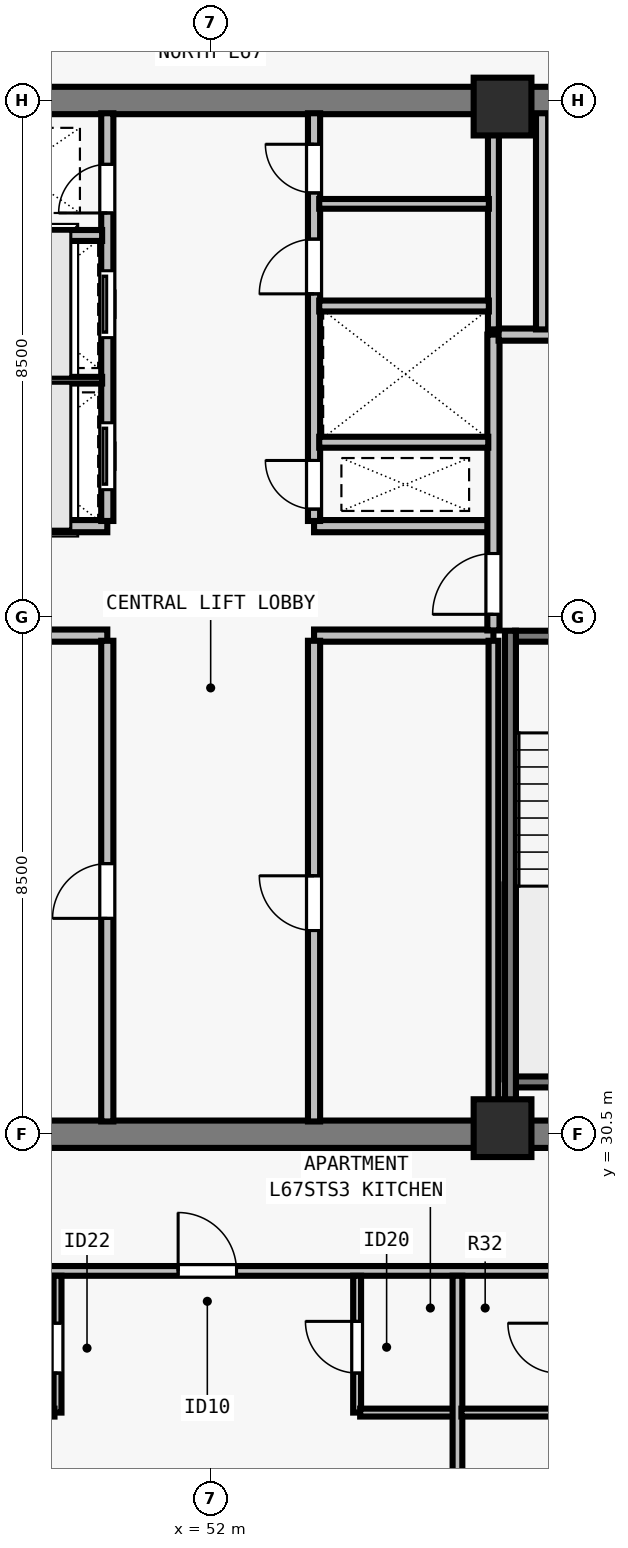
"""IFC4 building model, lengths in metres.
Left out: names, types, materials, properties, quantities, classifications, styles, units other than length and angle.
Written with IfcOpenShell. Run it as: python <this file> out.ifc"""

import sys

from ifc_helpers import new_model, si_unit, direction, frame, frame_2d, origin, origin_2d, place, context, subcontext, project, spatial, rectangle, extrude, element, fill, save


model = new_model("IFC4")
c1 = context("Model", 3, precision=1e-05, world=origin(), true_north=direction((0.0, 1.0)))
c2 = subcontext(c1, "Body", "Model", "MODEL_VIEW")
j1 = project(units=[si_unit("LENGTHUNIT", "METRE"), si_unit("PLANEANGLEUNIT", "RADIAN")], contexts=[c1])
p1 = place(None, origin())
s1 = spatial("IfcSite", under=j1, at=p1, CompositionType="ELEMENT")
p2 = place(p1, origin())
s2 = spatial("IfcBuilding", under=s1, at=p2, CompositionType="ELEMENT")
p3 = place(p2, frame((0.0, 0.0, 244.5)))
s3 = spatial("IfcBuildingStorey", under=s2, at=p3, CompositionType="ELEMENT", Elevation=244.5)
for number, where, z_axis, x_axis in (
    (1, (56.8, 30.6, 0.0), (0.0, 0.0, 1.0), (1.0, 0.0, 0.0)),
    (2, (56.8, 47.4, 0.0), (0.0, 0.0, 1.0), (1.0, 0.0, 0.0)),
):
    element("IfcColumn", number, at=place(p3, frame(where, z_axis=z_axis, x_axis=x_axis)), inside=s3, PredefinedType="COLUMN", context=c2, shape_type="SweptSolid", body=[
        extrude(rectangle(XDim=0.95, YDim=0.95, at=origin_2d()), origin(), (0.0, 0.0, 1.0), 3.5),
    ])
for number, where, z_axis, x_axis in (
    (3, (43.275, 30.5, 0.0), (0.0, 0.0, 1.0), (1.0, 0.0, 0.0)),
    (4, (43.275, 47.5, 0.0), (0.0, 0.0, 1.0), (1.0, 0.0, 0.0)),
):
    element("IfcWall", number, at=place(p3, frame(where, z_axis=z_axis, x_axis=x_axis)), inside=s3, PredefinedType="SHEAR", context=c2, shape_type="SweptSolid", body=[
        extrude(rectangle(XDim=17.45, YDim=0.45, at=frame_2d((8.725, 0.0))), origin(), (0.0, 0.0, 1.0), 3.29),
    ])
for number, where, z_axis, x_axis in (
    (5, (47.35, 38.7, 0.0), (0.0, 0.0, 1.0), (1.0, 0.0, 0.0)),
    (6, (47.35, 40.5, 0.0), (0.0, 0.0, 1.0), (1.0, 0.0, 0.0)),
    (7, (53.7, 38.7, 0.0), (0.0, 0.0, 1.0), (1.0, 0.0, 0.0)),
    (8, (53.7, 40.5, 0.0), (0.0, 0.0, 1.0), (1.0, 0.0, 0.0)),
):
    element("IfcWall", number, at=place(p3, frame(where, z_axis=z_axis, x_axis=x_axis)), inside=s3, PredefinedType="SOLIDWALL", context=c2, shape_type="SweptSolid", body=[
        extrude(rectangle(XDim=2.95, YDim=0.2, at=frame_2d((1.475, 0.0))), origin(), (0.0, 0.0, 1.0), 3.29),
    ])
p4 = place(p3, frame((50.3, 30.71, 0.0), z_axis=(0.0, 0.0, 1.0), x_axis=(0.0, 1.0, 0.0)))
e9 = element("IfcWall", 9, at=p4, inside=s3, PredefinedType="SOLIDWALL", context=c2, shape_type="SweptSolid", body=[
    extrude(rectangle(XDim=7.905, YDim=0.2, at=frame_2d((3.953, 0.0))), origin(), (0.0, 0.0, 1.0), 3.29),
])
p5 = place(p4, frame((3.34, 0.0, 0.0)))
e10 = element("IfcOpeningElement", 10, at=p5, cuts=e9, PredefinedType="OPENING", context=c2, shape_type="SweptSolid", body=[
    extrude(rectangle(XDim=0.9, YDim=2.12, at=frame_2d((0.45, 1.06))), frame((0.0, 0.11, 0.0), z_axis=(0.0, -1.0, 0.0), x_axis=(1.0, 0.0, 0.0)), (0.0, 0.0, 1.0), 0.22),
])
p6 = place(p3, frame((53.7, 30.71, 0.0), z_axis=(0.0, 0.0, 1.0), x_axis=(0.0, 1.0, 0.0)))
e11 = element("IfcWall", 11, at=p6, inside=s3, PredefinedType="SOLIDWALL", context=c2, shape_type="SweptSolid", body=[
    extrude(rectangle(XDim=7.905, YDim=0.2, at=frame_2d((3.953, 0.0))), origin(), (0.0, 0.0, 1.0), 3.29),
])
p7 = place(p6, frame((3.14, 0.0, 0.0)))
e12 = element("IfcOpeningElement", 12, at=p7, cuts=e11, PredefinedType="OPENING", context=c2, shape_type="SweptSolid", body=[
    extrude(rectangle(XDim=0.9, YDim=2.12, at=frame_2d((0.45, 1.06))), frame((0.0, 0.11, 0.0), z_axis=(0.0, -1.0, 0.0), x_axis=(1.0, 0.0, 0.0)), (0.0, 0.0, 1.0), 0.22),
])
p8 = place(p3, frame((50.3, 40.585, 0.0), z_axis=(0.0, 0.0, 1.0), x_axis=(0.0, 1.0, 0.0)))
e13 = element("IfcWall", 13, at=p8, inside=s3, PredefinedType="SOLIDWALL", context=c2, shape_type="SweptSolid", body=[
    extrude(rectangle(XDim=6.705, YDim=0.2, at=frame_2d((3.353, 0.0))), origin(), (0.0, 0.0, 1.0), 3.29),
])
p9 = place(p8, frame((0.515, 0.0, 0.0)))
e14 = element("IfcOpeningElement", 14, at=p9, cuts=e13, PredefinedType="OPENING", context=c2, shape_type="SweptSolid", body=[
    extrude(rectangle(XDim=1.1, YDim=2.2, at=frame_2d((0.55, 1.1))), frame((0.0, 0.11, 0.0), z_axis=(0.0, -1.0, 0.0), x_axis=(1.0, 0.0, 0.0)), (0.0, 0.0, 1.0), 0.22),
])
p10 = place(p8, frame((3.015, 0.0, 0.0)))
e15 = element("IfcOpeningElement", 15, at=p10, cuts=e13, PredefinedType="OPENING", context=c2, shape_type="SweptSolid", body=[
    extrude(rectangle(XDim=1.1, YDim=2.2, at=frame_2d((0.55, 1.1))), frame((0.0, 0.11, 0.0), z_axis=(0.0, -1.0, 0.0), x_axis=(1.0, 0.0, 0.0)), (0.0, 0.0, 1.0), 0.22),
])
p11 = place(p8, frame((5.065, 0.0, 0.0)))
e16 = element("IfcOpeningElement", 16, at=p11, cuts=e13, PredefinedType="OPENING", context=c2, shape_type="SweptSolid", body=[
    extrude(rectangle(XDim=0.8, YDim=2.08, at=frame_2d((0.4, 1.04))), frame((0.0, 0.11, 0.0), z_axis=(0.0, -1.0, 0.0), x_axis=(1.0, 0.0, 0.0)), (0.0, 0.0, 1.0), 0.22),
])
p12 = place(p3, frame((53.7, 40.585, 0.0), z_axis=(0.0, 0.0, 1.0), x_axis=(0.0, 1.0, 0.0)))
e17 = element("IfcWall", 17, at=p12, inside=s3, PredefinedType="SOLIDWALL", context=c2, shape_type="SweptSolid", body=[
    extrude(rectangle(XDim=6.705, YDim=0.2, at=frame_2d((3.353, 0.0))), origin(), (0.0, 0.0, 1.0), 3.29),
])
p13 = place(p12, frame((0.195, 0.0, 0.0)))
e18 = element("IfcOpeningElement", 18, at=p13, cuts=e17, PredefinedType="OPENING", context=c2, shape_type="SweptSolid", body=[
    extrude(rectangle(XDim=0.8, YDim=2.08, at=frame_2d((0.4, 1.04))), frame((0.0, 0.11, 0.0), z_axis=(0.0, -1.0, 0.0), x_axis=(1.0, 0.0, 0.0)), (0.0, 0.0, 1.0), 0.22),
])
p14 = place(p12, frame((3.735, 0.0, 0.0)))
e19 = element("IfcOpeningElement", 19, at=p14, cuts=e17, PredefinedType="OPENING", context=c2, shape_type="SweptSolid", body=[
    extrude(rectangle(XDim=0.9, YDim=2.12, at=frame_2d((0.45, 1.06))), frame((0.0, 0.11, 0.0), z_axis=(0.0, -1.0, 0.0), x_axis=(1.0, 0.0, 0.0)), (0.0, 0.0, 1.0), 0.22),
])
p15 = place(p12, frame((5.395, 0.0, 0.0)))
e20 = element("IfcOpeningElement", 20, at=p15, cuts=e17, PredefinedType="OPENING", context=c2, shape_type="SweptSolid", body=[
    extrude(rectangle(XDim=0.8, YDim=2.1, at=frame_2d((0.4, 1.05))), frame((0.0, 0.11, 0.0), z_axis=(0.0, -1.0, 0.0), x_axis=(1.0, 0.0, 0.0)), (0.0, 0.0, 1.0), 0.22),
])
p16 = place(p3, frame((56.65, 38.785, 0.0), z_axis=(0.0, 0.0, 1.0), x_axis=(0.0, 1.0, 0.0)))
e21 = element("IfcWall", 21, at=p16, inside=s3, PredefinedType="SOLIDWALL", context=c2, shape_type="SweptSolid", body=[
    extrude(rectangle(XDim=4.865, YDim=0.2, at=frame_2d((2.433, 0.0))), origin(), (0.0, 0.0, 1.0), 3.29),
])
p17 = place(p16, frame((0.265, 0.0, 0.0)))
e22 = element("IfcOpeningElement", 22, at=p17, cuts=e21, PredefinedType="OPENING", context=c2, shape_type="SweptSolid", body=[
    extrude(rectangle(XDim=1.0, YDim=2.15, at=frame_2d((0.5, 1.075))), frame((0.0, 0.11, 0.0), z_axis=(0.0, -1.0, 0.0), x_axis=(1.0, 0.0, 0.0)), (0.0, 0.0, 1.0), 0.22),
])
p18 = place(p3, frame((56.735, 43.65, 0.0), z_axis=(0.0, 0.0, 1.0), x_axis=(1.0, 0.0, 0.0)))
e23 = element("IfcWall", 23, at=p18, inside=s3, PredefinedType="SOLIDWALL", context=c2, shape_type="SweptSolid", body=[
    extrude(rectangle(XDim=3.555, YDim=0.2, at=frame_2d((1.777, 0.0))), origin(), (0.0, 0.0, 1.0), 3.29),
])
p19 = place(p18, frame((1.295, 0.0, 0.0)))
e24 = element("IfcOpeningElement", 24, at=p19, cuts=e23, PredefinedType="OPENING", context=c2, shape_type="SweptSolid", body=[
    extrude(rectangle(XDim=1.1, YDim=2.2, at=frame_2d((0.55, 1.1))), frame((0.0, 0.11, 0.0), z_axis=(0.0, -1.0, 0.0), x_axis=(1.0, 0.0, 0.0)), (0.0, 0.0, 1.0), 0.22),
])
p20 = place(p3, frame((57.45, 43.735, 0.0), z_axis=(0.0, 0.0, 1.0), x_axis=(0.0, 1.0, 0.0)))
e25 = element("IfcWall", 25, at=p20, inside=s3, PredefinedType="SOLIDWALL", context=c2, shape_type="SweptSolid", body=[
    extrude(rectangle(XDim=3.555, YDim=0.2, at=frame_2d((1.777, 0.0))), origin(), (0.0, 0.0, 1.0), 3.29),
])
p21 = place(p3, frame((56.65, 30.71, 0.0), z_axis=(0.0, 0.0, 1.0), x_axis=(0.0, 1.0, 0.0)))
e26 = element("IfcWall", 26, at=p21, inside=s3, PredefinedType="PARTITIONING", context=c2, shape_type="SweptSolid", body=[
    extrude(rectangle(XDim=7.905, YDim=0.16, at=frame_2d((3.953, 0.0))), origin(), (0.0, 0.0, 1.0), 3.29),
])
p22 = place(p3, frame((47.435, 42.9, 0.0), z_axis=(0.0, 0.0, 1.0), x_axis=(1.0, 0.0, 0.0)))
e27 = element("IfcWall", 27, at=p22, inside=s3, PredefinedType="PARTITIONING", context=c2, shape_type="SweptSolid", body=[
    extrude(rectangle(XDim=2.78, YDim=0.11, at=frame_2d((1.39, 0.0))), origin(), (0.0, 0.0, 1.0), 3.29),
])
p23 = place(p3, frame((47.425, 45.28, 0.0), z_axis=(0.0, 0.0, 1.0), x_axis=(1.0, 0.0, 0.0)))
e28 = element("IfcWall", 28, at=p23, inside=s3, PredefinedType="SOLIDWALL", context=c2, shape_type="SweptSolid", body=[
    extrude(rectangle(XDim=2.79, YDim=0.18, at=frame_2d((1.395, 0.0))), origin(), (0.0, 0.0, 1.0), 3.29),
])
p24 = place(p3, frame((56.65, 43.735, 0.0), z_axis=(0.0, 0.0, 1.0), x_axis=(0.0, 1.0, 0.0)))
e29 = element("IfcWall", 29, at=p24, inside=s3, PredefinedType="SOLIDWALL", context=c2, shape_type="SweptSolid", body=[
    extrude(rectangle(XDim=3.555, YDim=0.18, at=frame_2d((1.777, 0.0))), origin(), (0.0, 0.0, 1.0), 3.29),
])
p25 = place(p3, frame((53.785, 41.88, 0.0), z_axis=(0.0, 0.0, 1.0), x_axis=(1.0, 0.0, 0.0)))
e30 = element("IfcWall", 30, at=p25, inside=s3, PredefinedType="SOLIDWALL", context=c2, shape_type="SweptSolid", body=[
    extrude(rectangle(XDim=2.78, YDim=0.18, at=frame_2d((1.39, 0.0))), origin(), (0.0, 0.0, 1.0), 3.29),
])
p26 = place(p3, frame((53.785, 44.12, 0.0), z_axis=(0.0, 0.0, 1.0), x_axis=(1.0, 0.0, 0.0)))
e31 = element("IfcWall", 31, at=p26, inside=s3, PredefinedType="SOLIDWALL", context=c2, shape_type="SweptSolid", body=[
    extrude(rectangle(XDim=2.79, YDim=0.18, at=frame_2d((1.395, 0.0))), origin(), (0.0, 0.0, 1.0), 3.29),
])
p27 = place(p3, frame((53.785, 45.8, 0.0), z_axis=(0.0, 0.0, 1.0), x_axis=(1.0, 0.0, 0.0)))
e32 = element("IfcWall", 32, at=p27, inside=s3, PredefinedType="PARTITIONING", context=c2, shape_type="SweptSolid", body=[
    extrude(rectangle(XDim=2.79, YDim=0.16, at=frame_2d((1.395, 0.0))), origin(), (0.0, 0.0, 1.0), 3.29),
])
p28 = place(p3, frame((29.805, 28.252, 0.0), z_axis=(0.0, 0.0, 1.0), x_axis=(1.0, 0.0, 0.0)))
e33 = element("IfcWall", 33, at=p28, inside=s3, PredefinedType="PARTITIONING", context=c2, shape_type="SweptSolid", body=[
    extrude(rectangle(XDim=44.39, YDim=0.16, at=frame_2d((22.195, 0.0))), origin(), (0.0, 0.0, 1.0), 2.958),
])
p29 = place(p28, frame((3.872, 0.0, 0.0)))
e34 = element("IfcOpeningElement", 34, at=p29, cuts=e33, PredefinedType="OPENING", context=c2, shape_type="SweptSolid", body=[
    extrude(rectangle(XDim=0.96, YDim=2.18, at=frame_2d((0.48, 1.09))), frame((0.0, 0.09, 0.0), z_axis=(0.0, -1.0, 0.0), x_axis=(1.0, 0.0, 0.0)), (0.0, 0.0, 1.0), 0.18),
])
p30 = place(p28, frame((12.828, 0.0, 0.0)))
e35 = element("IfcOpeningElement", 35, at=p30, cuts=e33, PredefinedType="OPENING", context=c2, shape_type="SweptSolid", body=[
    extrude(rectangle(XDim=0.96, YDim=2.18, at=frame_2d((0.48, 1.09))), frame((0.0, 0.09, 0.0), z_axis=(0.0, -1.0, 0.0), x_axis=(1.0, 0.0, 0.0)), (0.0, 0.0, 1.0), 0.18),
])
p31 = place(p28, frame((21.66, 0.0, 0.0)))
e36 = element("IfcOpeningElement", 36, at=p31, cuts=e33, PredefinedType="OPENING", context=c2, shape_type="SweptSolid", body=[
    extrude(rectangle(XDim=0.96, YDim=2.18, at=frame_2d((0.48, 1.09))), frame((0.0, 0.09, 0.0), z_axis=(0.0, -1.0, 0.0), x_axis=(1.0, 0.0, 0.0)), (0.0, 0.0, 1.0), 0.18),
])
p32 = place(p28, frame((30.492, 0.0, 0.0)))
e37 = element("IfcOpeningElement", 37, at=p32, cuts=e33, PredefinedType="OPENING", context=c2, shape_type="SweptSolid", body=[
    extrude(rectangle(XDim=0.96, YDim=2.18, at=frame_2d((0.48, 1.09))), frame((0.0, 0.09, 0.0), z_axis=(0.0, -1.0, 0.0), x_axis=(1.0, 0.0, 0.0)), (0.0, 0.0, 1.0), 0.18),
])
p33 = place(p28, frame((39.503, 0.0, 0.0)))
e38 = element("IfcOpeningElement", 38, at=p33, cuts=e33, PredefinedType="OPENING", context=c2, shape_type="SweptSolid", body=[
    extrude(rectangle(XDim=0.96, YDim=2.18, at=frame_2d((0.48, 1.09))), frame((0.0, 0.09, 0.0), z_axis=(0.0, -1.0, 0.0), x_axis=(1.0, 0.0, 0.0)), (0.0, 0.0, 1.0), 0.18),
])
p34 = place(p3, frame((49.481, 25.923, 0.0), z_axis=(0.0, 0.0, 1.0), x_axis=(0.0, 1.0, 0.0)))
e39 = element("IfcWall", 39, at=p34, inside=s3, PredefinedType="PLUMBINGWALL", context=c2, shape_type="SweptSolid", body=[
    extrude(rectangle(XDim=2.25, YDim=0.13, at=frame_2d((1.125, 0.0))), origin(), (0.0, 0.0, 1.0), 3.29),
])
p35 = place(p34, frame((0.65, 0.0, 0.0)))
e40 = element("IfcOpeningElement", 40, at=p35, cuts=e39, PredefinedType="OPENING", context=c2, shape_type="SweptSolid", body=[
    extrude(rectangle(XDim=0.82, YDim=2.1, at=frame_2d((0.41, 1.05))), frame((0.0, 0.075, 0.0), z_axis=(0.0, -1.0, 0.0), x_axis=(1.0, 0.0, 0.0)), (0.0, 0.0, 1.0), 0.15),
])
p36 = place(p3, frame((47.896, 25.923, 0.0), z_axis=(0.0, 0.0, 1.0), x_axis=(1.0, 0.0, 0.0)))
e41 = element("IfcWall", 41, at=p36, inside=s3, PredefinedType="PLUMBINGWALL", context=c2, shape_type="SweptSolid", body=[
    extrude(rectangle(XDim=1.535, YDim=0.13, at=frame_2d((0.768, 0.0))), origin(), (0.0, 0.0, 1.0), 3.29),
])
p37 = place(p3, frame((54.408, 25.923, 0.0), z_axis=(0.0, 0.0, 1.0), x_axis=(0.0, 1.0, 0.0)))
e42 = element("IfcWall", 42, at=p37, inside=s3, PredefinedType="PLUMBINGWALL", context=c2, shape_type="SweptSolid", body=[
    extrude(rectangle(XDim=2.25, YDim=0.13, at=frame_2d((1.125, 0.0))), origin(), (0.0, 0.0, 1.0), 2.958),
])
p38 = place(p37, frame((0.65, 0.0, 0.0)))
e43 = element("IfcOpeningElement", 43, at=p38, cuts=e42, PredefinedType="OPENING", context=c2, shape_type="SweptSolid", body=[
    extrude(rectangle(XDim=0.85, YDim=2.1, at=frame_2d((0.425, 1.05))), frame((0.0, 0.075, 0.0), z_axis=(0.0, -1.0, 0.0), x_axis=(1.0, 0.0, 0.0)), (0.0, 0.0, 1.0), 0.15),
])
p39 = place(p3, frame((54.458, 25.923, 0.0), z_axis=(0.0, 0.0, 1.0), x_axis=(1.0, 0.0, 0.0)))
e44 = element("IfcWall", 44, at=p39, inside=s3, PredefinedType="PLUMBINGWALL", context=c2, shape_type="SweptSolid", body=[
    extrude(rectangle(XDim=1.6, YDim=0.13, at=frame_2d((0.8, 0.0))), origin(), (0.0, 0.0, 1.0), 3.29),
])
p40 = place(p3, frame((56.059, 16.805, 0.0), z_axis=(0.0, 0.0, 1.0), x_axis=(0.0, 1.0, 0.0)))
e45 = element("IfcWall", 45, at=p40, inside=s3, PredefinedType="PARTITIONING", context=c2, shape_type="SweptSolid", body=[
    extrude(rectangle(XDim=11.368, YDim=0.16, at=frame_2d((5.684, 0.0))), origin(), (0.0, 0.0, 1.0), 3.29),
])
p41 = place(p3, frame((56.124, 25.923, 0.0), z_axis=(0.0, 0.0, 1.0), x_axis=(1.0, 0.0, 0.0)))
e46 = element("IfcWall", 46, at=p41, inside=s3, PredefinedType="PLUMBINGWALL", context=c2, shape_type="SweptSolid", body=[
    extrude(rectangle(XDim=1.535, YDim=0.13, at=frame_2d((0.768, 0.0))), origin(), (0.0, 0.0, 1.0), 3.29),
])
p42 = place(p3, frame((57.005, 38.69, 0.0), z_axis=(0.0, 0.0, 1.0), x_axis=(1.0, 0.0, 0.0)))
e47 = element("IfcWall", 47, at=p42, inside=s3, PredefinedType="SOLIDWALL", context=c2, shape_type="SweptSolid", body=[
    extrude(rectangle(XDim=3.28, YDim=0.18, at=frame_2d((1.64, 0.0))), origin(), (0.0, 0.0, 1.0), 3.29),
])
p43 = place(p42, frame((1.165, 0.0, 0.0)))
e48 = element("IfcOpeningElement", 48, at=p43, cuts=e47, PredefinedType="OPENING", context=c2, shape_type="SweptSolid", body=[
    extrude(rectangle(XDim=0.95, YDim=2.15, at=frame_2d((0.475, 1.075))), frame((0.0, 0.1, 0.0), z_axis=(0.0, -1.0, 0.0), x_axis=(1.0, 0.0, 0.0)), (0.0, 0.0, 1.0), 0.2),
])
p44 = place(p3, frame((57.005, 31.36, 0.0), z_axis=(0.0, 0.0, 1.0), x_axis=(1.0, 0.0, 0.0)))
e49 = element("IfcWall", 49, at=p44, inside=s3, PredefinedType="SOLIDWALL", context=c2, shape_type="SweptSolid", body=[
    extrude(rectangle(XDim=3.28, YDim=0.18, at=frame_2d((1.64, 0.0))), origin(), (0.0, 0.0, 1.0), 3.29),
])
p45 = place(p3, frame((56.93, 38.78, 0.0), z_axis=(0.0, 0.0, 1.0), x_axis=(0.0, -1.0, 0.0)))
e50 = element("IfcWall", 50, at=p45, inside=s3, PredefinedType="SOLIDWALL", context=c2, shape_type="SweptSolid", body=[
    extrude(rectangle(XDim=8.067, YDim=0.18, at=frame_2d((4.034, 0.0))), origin(), (0.0, 0.0, 1.0), 3.29),
])
p46 = place(p17, origin())
e51 = element("IfcDoor", 51, at=p46, inside=s3, OperationType="SINGLE_SWING_LEFT", PredefinedType="DOOR", context=c2, shape_type="SweptSolid", body=[
    extrude(rectangle(XDim=1.0, YDim=2.15, at=frame_2d((0.5, 1.075))), frame((0.0, 0.025, 0.0), z_axis=(0.0, -1.0, 0.0), x_axis=(1.0, 0.0, 0.0)), (0.0, 0.0, 1.0), 0.05),
])
fill(e22, e51)
p47 = place(p5, origin())
e52 = element("IfcDoor", 52, at=p47, inside=s3, OperationType="SINGLE_SWING_LEFT", PredefinedType="DOOR", context=c2, shape_type="SweptSolid", body=[
    extrude(rectangle(XDim=0.9, YDim=2.12, at=frame_2d((0.45, 1.06))), frame((0.0, 0.025, 0.0), z_axis=(0.0, -1.0, 0.0), x_axis=(1.0, 0.0, 0.0)), (0.0, 0.0, 1.0), 0.05),
])
fill(e10, e52)
p48 = place(p7, origin())
e53 = element("IfcDoor", 53, at=p48, inside=s3, OperationType="SINGLE_SWING_RIGHT", PredefinedType="DOOR", context=c2, shape_type="SweptSolid", body=[
    extrude(rectangle(XDim=0.9, YDim=2.12, at=frame_2d((0.45, 1.06))), frame((0.0, 0.025, 0.0), z_axis=(0.0, -1.0, 0.0), x_axis=(1.0, 0.0, 0.0)), (0.0, 0.0, 1.0), 0.05),
])
fill(e12, e53)
p49 = place(p9, origin())
e54 = element("IfcDoor", 54, at=p49, inside=s3, OperationType="SLIDING_TO_LEFT", PredefinedType="DOOR", context=c2, shape_type="SweptSolid", body=[
    extrude(rectangle(XDim=1.1, YDim=2.2, at=frame_2d((0.55, 1.1))), frame((0.0, 0.025, 0.0), z_axis=(0.0, -1.0, 0.0), x_axis=(1.0, 0.0, 0.0)), (0.0, 0.0, 1.0), 0.05),
])
fill(e14, e54)
p50 = place(p10, origin())
e55 = element("IfcDoor", 55, at=p50, inside=s3, OperationType="SLIDING_TO_LEFT", PredefinedType="DOOR", context=c2, shape_type="SweptSolid", body=[
    extrude(rectangle(XDim=1.1, YDim=2.2, at=frame_2d((0.55, 1.1))), frame((0.0, 0.025, 0.0), z_axis=(0.0, -1.0, 0.0), x_axis=(1.0, 0.0, 0.0)), (0.0, 0.0, 1.0), 0.05),
])
fill(e15, e55)
p51 = place(p11, origin())
e56 = element("IfcDoor", 56, at=p51, inside=s3, OperationType="SINGLE_SWING_LEFT", PredefinedType="DOOR", context=c2, shape_type="SweptSolid", body=[
    extrude(rectangle(XDim=0.8, YDim=2.08, at=frame_2d((0.4, 1.04))), frame((0.0, 0.025, 0.0), z_axis=(0.0, -1.0, 0.0), x_axis=(1.0, 0.0, 0.0)), (0.0, 0.0, 1.0), 0.05),
])
fill(e16, e56)
p52 = place(p13, origin())
e57 = element("IfcDoor", 57, at=p52, inside=s3, OperationType="SINGLE_SWING_RIGHT", PredefinedType="DOOR", context=c2, shape_type="SweptSolid", body=[
    extrude(rectangle(XDim=0.8, YDim=2.08, at=frame_2d((0.4, 1.04))), frame((0.0, 0.025, 0.0), z_axis=(0.0, -1.0, 0.0), x_axis=(1.0, 0.0, 0.0)), (0.0, 0.0, 1.0), 0.05),
])
fill(e18, e57)
p53 = place(p14, origin())
e58 = element("IfcDoor", 58, at=p53, inside=s3, OperationType="SINGLE_SWING_LEFT", PredefinedType="DOOR", context=c2, shape_type="SweptSolid", body=[
    extrude(rectangle(XDim=0.9, YDim=2.12, at=frame_2d((0.45, 1.06))), frame((0.0, 0.025, 0.0), z_axis=(0.0, -1.0, 0.0), x_axis=(1.0, 0.0, 0.0)), (0.0, 0.0, 1.0), 0.05),
])
fill(e19, e58)
p54 = place(p15, origin())
e59 = element("IfcDoor", 59, at=p54, inside=s3, OperationType="SINGLE_SWING_RIGHT", PredefinedType="DOOR", context=c2, shape_type="SweptSolid", body=[
    extrude(rectangle(XDim=0.8, YDim=2.1, at=frame_2d((0.4, 1.05))), frame((0.0, 0.025, 0.0), z_axis=(0.0, -1.0, 0.0), x_axis=(1.0, 0.0, 0.0)), (0.0, 0.0, 1.0), 0.05),
])
fill(e20, e59)
p55 = place(p35, origin())
e60 = element("IfcDoor", 60, at=p55, inside=s3, OperationType="SINGLE_SWING_LEFT", PredefinedType="DOOR", context=c2, shape_type="SweptSolid", body=[
    extrude(rectangle(XDim=0.82, YDim=2.1, at=frame_2d((0.41, 1.05))), frame((0.0, 0.025, 0.0), z_axis=(0.0, -1.0, 0.0), x_axis=(1.0, 0.0, 0.0)), (0.0, 0.0, 1.0), 0.05),
])
fill(e40, e60)
p56 = place(p38, origin())
e61 = element("IfcDoor", 61, at=p56, inside=s3, OperationType="SINGLE_SWING_RIGHT", PredefinedType="DOOR", context=c2, shape_type="SweptSolid", body=[
    extrude(rectangle(XDim=0.85, YDim=2.1, at=frame_2d((0.425, 1.05))), frame((0.0, 0.025, 0.0), z_axis=(0.0, -1.0, 0.0), x_axis=(1.0, 0.0, 0.0)), (0.0, 0.0, 1.0), 0.05),
])
fill(e43, e61)
p57 = place(p31, origin())
e62 = element("IfcDoor", 62, at=p57, inside=s3, OperationType="SINGLE_SWING_LEFT", PredefinedType="DOOR", context=c2, shape_type="SweptSolid", body=[
    extrude(rectangle(XDim=0.96, YDim=2.18, at=frame_2d((0.48, 1.09))), frame((0.0, 0.025, 0.0), z_axis=(0.0, -1.0, 0.0), x_axis=(1.0, 0.0, 0.0)), (0.0, 0.0, 1.0), 0.05),
])
fill(e36, e62)
save(model, sys.argv[1])
